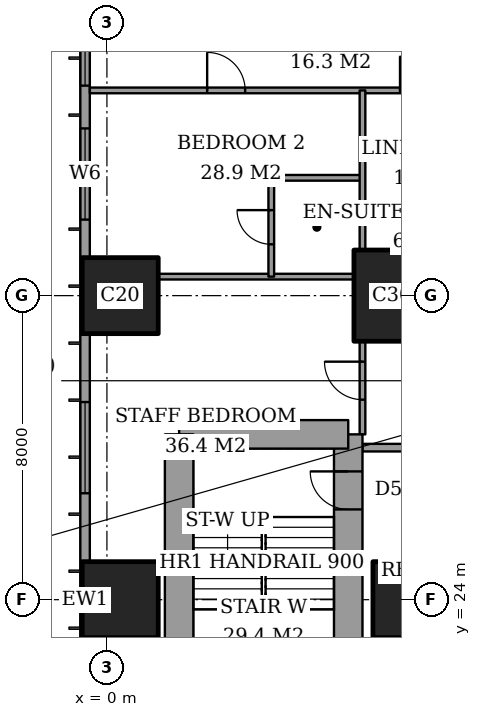
"""IFC4 building model, lengths in metres.
Left out: names, types, materials, properties, quantities, classifications, styles, units other than length and angle.
Written with IfcOpenShell. Run it as: python <this file> out.ifc"""

import sys

from ifc_helpers import new_model, si_unit, direction, frame, frame_2d, origin, origin_2d, place, context, subcontext, project, spatial, rectangle, extrude, element, fill, save


model = new_model("IFC4")
c1 = context("Model", 3, precision=1e-05, world=origin(), true_north=direction((0.0, 1.0)))
c2 = subcontext(c1, "Body", "Model", "MODEL_VIEW")
j1 = project(units=[si_unit("LENGTHUNIT", "METRE"), si_unit("PLANEANGLEUNIT", "RADIAN")], contexts=[c1])
p1 = place(None, origin())
s1 = spatial("IfcSite", under=j1, at=p1, CompositionType="ELEMENT")
p2 = place(p1, origin())
s2 = spatial("IfcBuilding", under=s1, at=p2, CompositionType="ELEMENT")
p3 = place(p2, frame((0.0, 0.0, 51.2)))
s3 = spatial("IfcBuildingStorey", under=s2, at=p3, CompositionType="ELEMENT", Elevation=51.2)
for number, where, z_axis, x_axis in (
    (1, (0.35, 24.0, 0.0), (0.0, 0.0, 1.0), (1.0, 0.0, 0.0)),
    (2, (0.35, 32.0, 0.0), (0.0, 0.0, 1.0), (1.0, 0.0, 0.0)),
    (3, (8.0, 24.0, 0.0), (0.0, 0.0, 1.0), (1.0, 0.0, 0.0)),
):
    element("IfcColumn", number, at=place(p3, frame(where, z_axis=z_axis, x_axis=x_axis)), inside=s3, PredefinedType="COLUMN", context=c2, shape_type="SweptSolid", body=[
        extrude(rectangle(XDim=2.0, YDim=2.0, at=origin_2d()), origin(), (0.0, 0.0, 1.0), 3.6),
    ])
p4 = place(p3, frame((8.0, 32.0, 0.0), z_axis=(0.0, 0.0, 1.0), x_axis=(1.0, 0.0, 0.0)))
e4 = element("IfcColumn", 4, at=p4, inside=s3, PredefinedType="COLUMN", context=c2, shape_type="SweptSolid", body=[
    extrude(rectangle(XDim=3.0, YDim=2.4, at=origin_2d()), origin(), (0.0, 0.0, 1.0), 3.6),
])
p5 = place(p3, frame((6.35, 19.65, 0.0), z_axis=(0.0, 0.0, 1.0), x_axis=(0.0, 1.0, 0.0)))
e5 = element("IfcWall", 5, at=p5, inside=s3, PredefinedType="SHEAR", context=c2, shape_type="SweptSolid", body=[
    extrude(rectangle(XDim=8.7, YDim=0.75, at=frame_2d((4.35, 0.0))), origin(), (0.0, 0.0, 1.0), 3.6),
])
p6 = place(p5, frame((6.725, 0.0, 0.0)))
e6 = element("IfcOpeningElement", 6, at=p6, cuts=e5, PredefinedType="OPENING", context=c2, shape_type="SweptSolid", body=[
    extrude(rectangle(XDim=1.0, YDim=2.1, at=frame_2d((0.5, 1.05))), frame((0.0, 0.385, 0.0), z_axis=(0.0, -1.0, 0.0), x_axis=(1.0, 0.0, 0.0)), (0.0, 0.0, 1.0), 0.77),
])
p7 = place(p3, frame((6.35, 28.35, 0.0), z_axis=(0.0, 0.0, 1.0), x_axis=(-1.0, 0.0, 0.0)))
e7 = element("IfcWall", 7, at=p7, inside=s3, PredefinedType="SHEAR", context=c2, shape_type="SweptSolid", body=[
    extrude(rectangle(XDim=4.45, YDim=0.75, at=frame_2d((2.225, 0.0))), origin(), (0.0, 0.0, 1.0), 3.6),
])
p8 = place(p3, frame((1.9, 28.35, 0.0), z_axis=(0.0, 0.0, 1.0), x_axis=(0.0, -1.0, 0.0)))
e8 = element("IfcWall", 8, at=p8, inside=s3, PredefinedType="SHEAR", context=c2, shape_type="SweptSolid", body=[
    extrude(rectangle(XDim=8.7, YDim=0.75, at=frame_2d((4.35, 0.0))), origin(), (0.0, 0.0, 1.0), 3.6),
])
p9 = place(p3, frame((-0.575, 44.825, 0.0), z_axis=(0.0, 0.0, 1.0), x_axis=(0.0, -1.0, 0.0)))
e9 = element("IfcWall", 9, at=p9, inside=s3, PredefinedType="SOLIDWALL", context=c2, shape_type="SweptSolid", body=[
    extrude(rectangle(XDim=41.65, YDim=0.25, at=frame_2d((20.825, 0.0))), origin(), (0.0, 0.0, 1.0), 3.6),
])
p10 = place(p9, frame((0.775, 0.0, 0.6)))
e10 = element("IfcOpeningElement", 10, at=p10, cuts=e9, PredefinedType="OPENING", context=c2, shape_type="SweptSolid", body=[
    extrude(rectangle(XDim=2.4, YDim=2.0, at=frame_2d((1.2, 1.0))), frame((0.0, 0.135, 0.0), z_axis=(0.0, -1.0, 0.0), x_axis=(1.0, 0.0, 0.0)), (0.0, 0.0, 1.0), 0.27),
])
p11 = place(p9, frame((6.1, 0.0, 0.6)))
e11 = element("IfcOpeningElement", 11, at=p11, cuts=e9, PredefinedType="OPENING", context=c2, shape_type="SweptSolid", body=[
    extrude(rectangle(XDim=1.2, YDim=2.0, at=frame_2d((0.6, 1.0))), frame((0.0, 0.135, 0.0), z_axis=(0.0, -1.0, 0.0), x_axis=(1.0, 0.0, 0.0)), (0.0, 0.0, 1.0), 0.27),
])
p12 = place(p9, frame((8.425, 0.0, 0.6)))
e12 = element("IfcOpeningElement", 12, at=p12, cuts=e9, PredefinedType="OPENING", context=c2, shape_type="SweptSolid", body=[
    extrude(rectangle(XDim=2.4, YDim=2.0, at=frame_2d((1.2, 1.0))), frame((0.0, 0.135, 0.0), z_axis=(0.0, -1.0, 0.0), x_axis=(1.0, 0.0, 0.0)), (0.0, 0.0, 1.0), 0.27),
])
p13 = place(p9, frame((15.625, 0.0, 0.6)))
e13 = element("IfcOpeningElement", 13, at=p13, cuts=e9, PredefinedType="OPENING", context=c2, shape_type="SweptSolid", body=[
    extrude(rectangle(XDim=2.4, YDim=2.0, at=frame_2d((1.2, 1.0))), frame((0.0, 0.135, 0.0), z_axis=(0.0, -1.0, 0.0), x_axis=(1.0, 0.0, 0.0)), (0.0, 0.0, 1.0), 0.27),
])
p14 = place(p9, frame((23.625, 0.0, 0.6)))
e14 = element("IfcOpeningElement", 14, at=p14, cuts=e9, PredefinedType="OPENING", context=c2, shape_type="SweptSolid", body=[
    extrude(rectangle(XDim=2.4, YDim=2.0, at=frame_2d((1.2, 1.0))), frame((0.0, 0.135, 0.0), z_axis=(0.0, -1.0, 0.0), x_axis=(1.0, 0.0, 0.0)), (0.0, 0.0, 1.0), 0.27),
])
p15 = place(p9, frame((30.825, 0.0, 0.6)))
e15 = element("IfcOpeningElement", 15, at=p15, cuts=e9, PredefinedType="OPENING", context=c2, shape_type="SweptSolid", body=[
    extrude(rectangle(XDim=2.4, YDim=2.0, at=frame_2d((1.2, 1.0))), frame((0.0, 0.135, 0.0), z_axis=(0.0, -1.0, 0.0), x_axis=(1.0, 0.0, 0.0)), (0.0, 0.0, 1.0), 0.27),
])
p16 = place(p9, frame((34.5, 0.0, 0.6)))
e16 = element("IfcOpeningElement", 16, at=p16, cuts=e9, PredefinedType="OPENING", context=c2, shape_type="SweptSolid", body=[
    extrude(rectangle(XDim=1.2, YDim=2.0, at=frame_2d((0.6, 1.0))), frame((0.0, 0.135, 0.0), z_axis=(0.0, -1.0, 0.0), x_axis=(1.0, 0.0, 0.0)), (0.0, 0.0, 1.0), 0.27),
])
p17 = place(p9, frame((38.475, 0.0, 0.6)))
e17 = element("IfcOpeningElement", 17, at=p17, cuts=e9, PredefinedType="OPENING", context=c2, shape_type="SweptSolid", body=[
    extrude(rectangle(XDim=2.4, YDim=2.0, at=frame_2d((1.2, 1.0))), frame((0.0, 0.135, 0.0), z_axis=(0.0, -1.0, 0.0), x_axis=(1.0, 0.0, 0.0)), (0.0, 0.0, 1.0), 0.27),
])
p18 = place(p3, frame((6.725, 28.0, 0.0), z_axis=(0.0, 0.0, 1.0), x_axis=(1.0, 0.0, 0.0)))
e18 = element("IfcWall", 18, at=p18, inside=s3, PredefinedType="PARTITIONING", context=c2, shape_type="SweptSolid", body=[
    extrude(rectangle(XDim=17.275, YDim=0.2, at=frame_2d((8.637, 0.0))), origin(), (0.0, 0.0, 1.0), 3.35),
])
p19 = place(p18, frame((6.475, 0.0, 0.0)))
e19 = element("IfcOpeningElement", 19, at=p19, cuts=e18, PredefinedType="OPENING", context=c2, shape_type="SweptSolid", body=[
    extrude(rectangle(XDim=1.2, YDim=2.4, at=frame_2d((0.6, 1.2))), frame((0.0, 0.11, 0.0), z_axis=(0.0, -1.0, 0.0), x_axis=(1.0, 0.0, 0.0)), (0.0, 0.0, 1.0), 0.22),
])
p20 = place(p3, frame((1.35, 32.5, 0.0), z_axis=(0.0, 0.0, 1.0), x_axis=(1.0, 0.0, 0.0)))
e20 = element("IfcWall", 20, at=p20, inside=s3, PredefinedType="PARTITIONING", context=c2, shape_type="SweptSolid", body=[
    extrude(rectangle(XDim=5.15, YDim=0.15, at=frame_2d((2.575, 0.0))), origin(), (0.0, 0.0, 1.0), 3.35),
])
p21 = place(p3, frame((4.325, 35.1, 0.0), z_axis=(0.0, 0.0, 1.0), x_axis=(1.0, 0.0, 0.0)))
e21 = element("IfcWall", 21, at=p21, inside=s3, PredefinedType="PARTITIONING", context=c2, shape_type="SweptSolid", body=[
    extrude(rectangle(XDim=2.4, YDim=0.15, at=frame_2d((1.2, 0.0))), origin(), (0.0, 0.0, 1.0), 3.35),
])
p22 = place(p3, frame((-0.45, 37.4, 0.0), z_axis=(0.0, 0.0, 1.0), x_axis=(1.0, 0.0, 0.0)))
e22 = element("IfcWall", 22, at=p22, inside=s3, PredefinedType="PARTITIONING", context=c2, shape_type="SweptSolid", body=[
    extrude(rectangle(XDim=25.011, YDim=0.15, at=frame_2d((12.505, 0.0))), origin(), (0.0, 0.0, 1.0), 3.35),
])
p23 = place(p22, frame((10.65, 0.0, 0.0)))
e23 = element("IfcOpeningElement", 23, at=p23, cuts=e22, PredefinedType="OPENING", context=c2, shape_type="SweptSolid", body=[
    extrude(rectangle(XDim=1.0, YDim=2.1, at=frame_2d((0.5, 1.05))), frame((0.0, 0.085, 0.0), z_axis=(0.0, -1.0, 0.0), x_axis=(1.0, 0.0, 0.0)), (0.0, 0.0, 1.0), 0.17),
])
p24 = place(p22, frame((3.087, 0.0, 0.0)))
e24 = element("IfcOpeningElement", 24, at=p24, cuts=e22, PredefinedType="OPENING", context=c2, shape_type="SweptSolid", body=[
    extrude(rectangle(XDim=1.0, YDim=2.1, at=frame_2d((0.5, 1.05))), frame((0.0, 0.085, 0.0), z_axis=(0.0, -1.0, 0.0), x_axis=(1.0, 0.0, 0.0)), (0.0, 0.0, 1.0), 0.17),
])
p25 = place(p22, frame((8.163, 0.0, 0.0)))
e25 = element("IfcOpeningElement", 25, at=p25, cuts=e22, PredefinedType="OPENING", context=c2, shape_type="SweptSolid", body=[
    extrude(rectangle(XDim=0.9, YDim=2.1, at=frame_2d((0.45, 1.05))), frame((0.0, 0.085, 0.0), z_axis=(0.0, -1.0, 0.0), x_axis=(1.0, 0.0, 0.0)), (0.0, 0.0, 1.0), 0.17),
])
p26 = place(p22, frame((13.35, 0.0, 0.0)))
e26 = element("IfcOpeningElement", 26, at=p26, cuts=e22, PredefinedType="OPENING", context=c2, shape_type="SweptSolid", body=[
    extrude(rectangle(XDim=1.0, YDim=2.1, at=frame_2d((0.5, 1.05))), frame((0.0, 0.085, 0.0), z_axis=(0.0, -1.0, 0.0), x_axis=(1.0, 0.0, 0.0)), (0.0, 0.0, 1.0), 0.17),
])
p27 = place(p22, frame((16.45, 0.0, 0.0)))
e27 = element("IfcOpeningElement", 27, at=p27, cuts=e22, PredefinedType="OPENING", context=c2, shape_type="SweptSolid", body=[
    extrude(rectangle(XDim=1.0, YDim=2.1, at=frame_2d((0.5, 1.05))), frame((0.0, 0.085, 0.0), z_axis=(0.0, -1.0, 0.0), x_axis=(1.0, 0.0, 0.0)), (0.0, 0.0, 1.0), 0.17),
])
p28 = place(p22, frame((21.175, 0.0, 0.0)))
e28 = element("IfcOpeningElement", 28, at=p28, cuts=e22, PredefinedType="OPENING", context=c2, shape_type="SweptSolid", body=[
    extrude(rectangle(XDim=1.0, YDim=2.1, at=frame_2d((0.5, 1.05))), frame((0.0, 0.085, 0.0), z_axis=(0.0, -1.0, 0.0), x_axis=(1.0, 0.0, 0.0)), (0.0, 0.0, 1.0), 0.17),
])
p29 = place(p3, frame((4.325, 32.5, 0.0), z_axis=(0.0, 0.0, 1.0), x_axis=(0.0, 1.0, 0.0)))
e29 = element("IfcWall", 29, at=p29, inside=s3, PredefinedType="PARTITIONING", context=c2, shape_type="SweptSolid", body=[
    extrude(rectangle(XDim=2.6, YDim=0.15, at=frame_2d((1.3, 0.0))), origin(), (0.0, 0.0, 1.0), 3.35),
])
p30 = place(p29, frame((0.85, 0.0, 0.0)))
e30 = element("IfcOpeningElement", 30, at=p30, cuts=e29, PredefinedType="OPENING", context=c2, shape_type="SweptSolid", body=[
    extrude(rectangle(XDim=0.9, YDim=2.1, at=frame_2d((0.45, 1.05))), frame((0.0, 0.085, 0.0), z_axis=(0.0, -1.0, 0.0), x_axis=(1.0, 0.0, 0.0)), (0.0, 0.0, 1.0), 0.17),
])
p31 = place(p3, frame((6.725, 28.35, 0.0), z_axis=(0.0, 0.0, 1.0), x_axis=(0.0, 1.0, 0.0)))
e31 = element("IfcWall", 31, at=p31, inside=s3, PredefinedType="PARTITIONING", context=c2, shape_type="SweptSolid", body=[
    extrude(rectangle(XDim=2.45, YDim=0.15, at=frame_2d((1.225, 0.0))), origin(), (0.0, 0.0, 1.0), 3.35),
])
p32 = place(p31, frame((0.913, 0.0, 0.0)))
e32 = element("IfcOpeningElement", 32, at=p32, cuts=e31, PredefinedType="OPENING", context=c2, shape_type="SweptSolid", body=[
    extrude(rectangle(XDim=1.0, YDim=2.1, at=frame_2d((0.5, 1.05))), frame((0.0, 0.085, 0.0), z_axis=(0.0, -1.0, 0.0), x_axis=(1.0, 0.0, 0.0)), (0.0, 0.0, 1.0), 0.17),
])
p33 = place(p3, frame((6.725, 33.2, 0.0), z_axis=(0.0, 0.0, 1.0), x_axis=(0.0, 1.0, 0.0)))
e33 = element("IfcWall", 33, at=p33, inside=s3, PredefinedType="PARTITIONING", context=c2, shape_type="SweptSolid", body=[
    extrude(rectangle(XDim=4.2, YDim=0.15, at=frame_2d((2.1, 0.0))), origin(), (0.0, 0.0, 1.0), 3.35),
])
p34 = place(p11, origin())
e34 = element("IfcWindow", 34, at=p34, inside=s3, PartitioningType="SINGLE_PANEL", PredefinedType="WINDOW", context=c2, shape_type="SweptSolid", body=[
    extrude(rectangle(XDim=1.2, YDim=2.0, at=frame_2d((0.6, 1.0))), frame((0.0, 0.03, 0.0), z_axis=(0.0, -1.0, 0.0), x_axis=(1.0, 0.0, 0.0)), (0.0, 0.0, 1.0), 0.06),
])
fill(e11, e34)
p35 = place(p12, origin())
e35 = element("IfcWindow", 35, at=p35, inside=s3, PartitioningType="SINGLE_PANEL", PredefinedType="WINDOW", context=c2, shape_type="SweptSolid", body=[
    extrude(rectangle(XDim=2.4, YDim=2.0, at=frame_2d((1.2, 1.0))), frame((0.0, 0.03, 0.0), z_axis=(0.0, -1.0, 0.0), x_axis=(1.0, 0.0, 0.0)), (0.0, 0.0, 1.0), 0.06),
])
fill(e12, e35)
p36 = place(p13, origin())
e36 = element("IfcWindow", 36, at=p36, inside=s3, PartitioningType="SINGLE_PANEL", PredefinedType="WINDOW", context=c2, shape_type="SweptSolid", body=[
    extrude(rectangle(XDim=2.4, YDim=2.0, at=frame_2d((1.2, 1.0))), frame((0.0, 0.03, 0.0), z_axis=(0.0, -1.0, 0.0), x_axis=(1.0, 0.0, 0.0)), (0.0, 0.0, 1.0), 0.06),
])
fill(e13, e36)
p37 = place(p30, origin())
e37 = element("IfcDoor", 37, at=p37, inside=s3, OperationType="SINGLE_SWING_LEFT", PredefinedType="DOOR", context=c2, shape_type="SweptSolid", body=[
    extrude(rectangle(XDim=0.9, YDim=2.1, at=frame_2d((0.45, 1.05))), frame((0.0, 0.025, 0.0), z_axis=(0.0, -1.0, 0.0), x_axis=(1.0, 0.0, 0.0)), (0.0, 0.0, 1.0), 0.05),
])
fill(e30, e37)
p38 = place(p24, origin())
e38 = element("IfcDoor", 38, at=p38, inside=s3, OperationType="SINGLE_SWING_RIGHT", PredefinedType="DOOR", context=c2, shape_type="SweptSolid", body=[
    extrude(rectangle(XDim=1.0, YDim=2.1, at=frame_2d((0.5, 1.05))), frame((0.0, 0.025, 0.0), z_axis=(0.0, -1.0, 0.0), x_axis=(1.0, 0.0, 0.0)), (0.0, 0.0, 1.0), 0.05),
])
fill(e24, e38)
p39 = place(p32, origin())
e39 = element("IfcDoor", 39, at=p39, inside=s3, OperationType="SINGLE_SWING_LEFT", PredefinedType="DOOR", context=c2, shape_type="SweptSolid", body=[
    extrude(rectangle(XDim=1.0, YDim=2.1, at=frame_2d((0.5, 1.05))), frame((0.0, 0.025, 0.0), z_axis=(0.0, -1.0, 0.0), x_axis=(1.0, 0.0, 0.0)), (0.0, 0.0, 1.0), 0.05),
])
fill(e32, e39)
p40 = place(p25, origin())
e40 = element("IfcDoor", 40, at=p40, inside=s3, OperationType="SINGLE_SWING_RIGHT", PredefinedType="DOOR", context=c2, shape_type="SweptSolid", body=[
    extrude(rectangle(XDim=0.9, YDim=2.1, at=frame_2d((0.45, 1.05))), frame((0.0, 0.025, 0.0), z_axis=(0.0, -1.0, 0.0), x_axis=(1.0, 0.0, 0.0)), (0.0, 0.0, 1.0), 0.05),
])
fill(e25, e40)
p41 = place(p6, origin())
e41 = element("IfcDoor", 41, at=p41, inside=s3, OperationType="SINGLE_SWING_LEFT", PredefinedType="DOOR", context=c2, shape_type="SweptSolid", body=[
    extrude(rectangle(XDim=1.0, YDim=2.1, at=frame_2d((0.5, 1.05))), frame((0.0, 0.025, 0.0), z_axis=(0.0, -1.0, 0.0), x_axis=(1.0, 0.0, 0.0)), (0.0, 0.0, 1.0), 0.05),
])
fill(e6, e41)
save(model, sys.argv[1])
